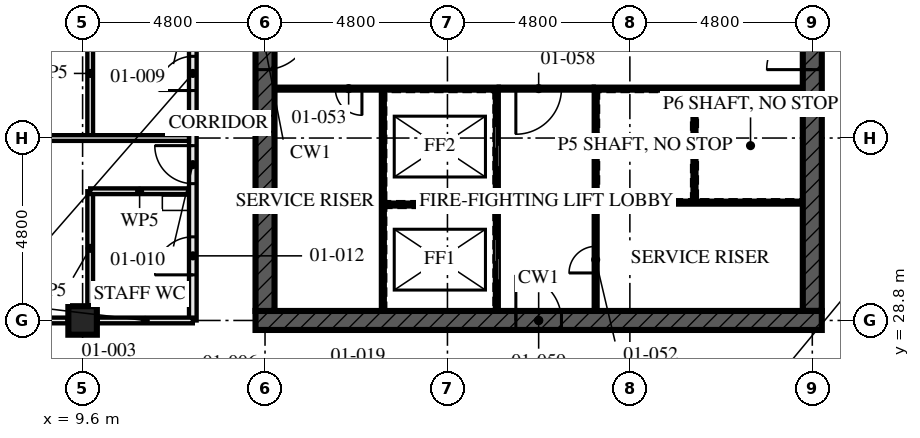
"""IFC4 building model, lengths in metres.
Left out: names, types, materials, properties, quantities, classifications, styles, units other than length and angle.
Written with IfcOpenShell. Run it as: python <this file> out.ifc"""

import sys

from ifc_helpers import new_model, si_unit, direction, frame, frame_2d, origin, origin_2d, place, context, subcontext, project, spatial, rectangle, hollow_rectangle, extrude, element, fill, save


model = new_model("IFC4")
c1 = context("Model", 3, precision=1e-05, world=origin(), true_north=direction((0.0, 1.0)))
c2 = subcontext(c1, "Body", "Model", "MODEL_VIEW")
j1 = project(units=[si_unit("LENGTHUNIT", "METRE"), si_unit("PLANEANGLEUNIT", "RADIAN")], contexts=[c1])
p1 = place(None, origin())
s1 = spatial("IfcSite", under=j1, at=p1, CompositionType="ELEMENT")
p2 = place(p1, origin())
s2 = spatial("IfcBuilding", under=s1, at=p2, CompositionType="ELEMENT")
p3 = place(p2, frame((0.0, 0.0, 4.5)))
s3 = spatial("IfcBuildingStorey", under=s2, at=p3, CompositionType="ELEMENT", Elevation=4.5)
p4 = place(p3, frame((9.6, 28.8, 0.0), z_axis=(0.0, 0.0, 1.0), x_axis=(0.0, 1.0, 0.0)))
e1 = element("IfcColumn", 1, at=p4, inside=s3, PredefinedType="COLUMN", context=c2, shape_type="SweptSolid", body=[
    extrude(hollow_rectangle(XDim=0.75, YDim=0.75, WallThickness=0.08, at=origin_2d()), origin(), (0.0, 0.0, 1.0), 4.5),
])
p5 = place(p3, frame((14.15, 28.8, -0.17), z_axis=(0.0, 0.0, 1.0), x_axis=(1.0, 0.0, 0.0)))
e2 = element("IfcWall", 2, at=p5, inside=s3, PredefinedType="SHEAR", context=c2, shape_type="SweptSolid", body=[
    extrude(rectangle(XDim=14.9, YDim=0.5, at=frame_2d((7.45, 0.0))), origin(), (0.0, 0.0, 1.0), 4.5),
])
p6 = place(p5, frame((6.85, 0.0, 0.17)))
e3 = element("IfcOpeningElement", 3, at=p6, cuts=e2, PredefinedType="OPENING", context=c2, shape_type="SweptSolid", body=[
    extrude(rectangle(XDim=1.2, YDim=2.1, at=frame_2d((0.6, 1.05))), frame((0.0, 0.26, 0.0), z_axis=(0.0, -1.0, 0.0), x_axis=(1.0, 0.0, 0.0)), (0.0, 0.0, 1.0), 0.521),
])
p7 = place(p3, frame((14.4, 42.95, -0.17), z_axis=(0.0, 0.0, 1.0), x_axis=(0.0, -1.0, 0.0)))
e4 = element("IfcWall", 4, at=p7, inside=s3, PredefinedType="SHEAR", context=c2, shape_type="SweptSolid", body=[
    extrude(rectangle(XDim=13.9, YDim=0.5, at=frame_2d((6.95, 0.0))), origin(), (0.0, 0.0, 1.0), 4.5),
])
p8 = place(p7, frame((6.35, 0.0, 0.17)))
e5 = element("IfcOpeningElement", 5, at=p8, cuts=e4, PredefinedType="OPENING", context=c2, shape_type="SweptSolid", body=[
    extrude(rectangle(XDim=1.2, YDim=2.1, at=frame_2d((0.6, 1.05))), frame((0.0, 0.26, 0.0), z_axis=(0.0, -1.0, 0.0), x_axis=(1.0, 0.0, 0.0)), (0.0, 0.0, 1.0), 0.521),
])
p9 = place(p3, frame((28.8, 29.05, -0.17), z_axis=(0.0, 0.0, 1.0), x_axis=(0.0, 1.0, 0.0)))
e6 = element("IfcWall", 6, at=p9, inside=s3, PredefinedType="SHEAR", context=c2, shape_type="SweptSolid", body=[
    extrude(rectangle(XDim=13.9, YDim=0.5, at=frame_2d((6.95, 0.0))), origin(), (0.0, 0.0, 1.0), 4.5),
])
p10 = place(p9, frame((6.35, 0.0, 0.17)))
e7 = element("IfcOpeningElement", 7, at=p10, cuts=e6, PredefinedType="OPENING", context=c2, shape_type="SweptSolid", body=[
    extrude(rectangle(XDim=1.2, YDim=2.1, at=frame_2d((0.6, 1.05))), frame((0.0, 0.26, 0.0), z_axis=(0.0, -1.0, 0.0), x_axis=(1.0, 0.0, 0.0)), (0.0, 0.0, 1.0), 0.521),
])
p11 = place(p3, frame((9.8, 37.0, 0.0), z_axis=(0.0, 0.0, 1.0), x_axis=(0.0, -1.0, 0.0)))
e8 = element("IfcWall", 8, at=p11, inside=s3, PredefinedType="PARTITIONING", context=c2, shape_type="SweptSolid", body=[
    extrude(rectangle(XDim=3.4, YDim=0.15, at=frame_2d((1.7, 0.0))), origin(), (0.0, 0.0, 1.0), 4.33),
])
p12 = place(p3, frame((9.8, 32.2, 0.0), z_axis=(0.0, 0.0, 1.0), x_axis=(1.0, 0.0, 0.0)))
e9 = element("IfcWall", 9, at=p12, inside=s3, PredefinedType="PARTITIONING", context=c2, shape_type="SweptSolid", body=[
    extrude(rectangle(XDim=2.6, YDim=0.15, at=frame_2d((1.3, 0.0))), origin(), (0.0, 0.0, 1.0), 4.33),
])
p13 = place(p3, frame((9.8, 32.2, 0.0), z_axis=(0.0, 0.0, 1.0), x_axis=(0.0, -1.0, 0.0)))
e10 = element("IfcWall", 10, at=p13, inside=s3, PredefinedType="PARTITIONING", context=c2, shape_type="SweptSolid", body=[
    extrude(rectangle(XDim=3.005, YDim=0.15, at=frame_2d((1.502, 0.0))), origin(), (0.0, 0.0, 1.0), 4.33),
])
p14 = place(p3, frame((0.395, 33.6, 0.0), z_axis=(0.0, 0.0, 1.0), x_axis=(1.0, 0.0, 0.0)))
e11 = element("IfcWall", 11, at=p14, inside=s3, PredefinedType="PARTITIONING", context=c2, shape_type="SweptSolid", body=[
    extrude(rectangle(XDim=12.005, YDim=0.15, at=frame_2d((6.002, 0.0))), origin(), (0.0, 0.0, 1.0), 3.55),
])
p15 = place(p3, frame((12.5, 43.2, 0.0), z_axis=(0.0, 0.0, 1.0), x_axis=(0.0, -1.0, 0.0)))
e12 = element("IfcWall", 12, at=p15, inside=s3, PredefinedType="PARTITIONING", context=c2, shape_type="SweptSolid", body=[
    extrude(rectangle(XDim=14.4, YDim=0.2, at=frame_2d((7.2, 0.0))), origin(), (0.0, 0.0, 1.0), 3.55),
])
p16 = place(p15, frame((1.4, 0.0, 0.0)))
e13 = element("IfcOpeningElement", 13, at=p16, cuts=e12, PredefinedType="OPENING", context=c2, shape_type="SweptSolid", body=[
    extrude(rectangle(XDim=1.0, YDim=2.1, at=frame_2d((0.5, 1.05))), frame((0.0, 0.111, 0.0), z_axis=(0.0, -1.0, 0.0), x_axis=(1.0, 0.0, 0.0)), (0.0, 0.0, 1.0), 0.221),
])
p17 = place(p15, frame((3.6, 0.0, 0.0)))
e14 = element("IfcOpeningElement", 14, at=p17, cuts=e12, PredefinedType="OPENING", context=c2, shape_type="SweptSolid", body=[
    extrude(rectangle(XDim=1.0, YDim=2.4, at=frame_2d((0.5, 1.2))), frame((0.0, 0.111, 0.0), z_axis=(0.0, -1.0, 0.0), x_axis=(1.0, 0.0, 0.0)), (0.0, 0.0, 1.0), 0.221),
])
p18 = place(p15, frame((5.0, 0.0, 0.0)))
e15 = element("IfcOpeningElement", 15, at=p18, cuts=e12, PredefinedType="OPENING", context=c2, shape_type="SweptSolid", body=[
    extrude(rectangle(XDim=1.0, YDim=2.4, at=frame_2d((0.5, 1.2))), frame((0.0, 0.111, 0.0), z_axis=(0.0, -1.0, 0.0), x_axis=(1.0, 0.0, 0.0)), (0.0, 0.0, 1.0), 0.221),
])
p19 = place(p15, frame((9.8, 0.0, 0.0)))
e16 = element("IfcOpeningElement", 16, at=p19, cuts=e12, PredefinedType="OPENING", context=c2, shape_type="SweptSolid", body=[
    extrude(rectangle(XDim=1.0, YDim=2.4, at=frame_2d((0.5, 1.2))), frame((0.0, 0.111, 0.0), z_axis=(0.0, -1.0, 0.0), x_axis=(1.0, 0.0, 0.0)), (0.0, 0.0, 1.0), 0.221),
])
p20 = place(p15, frame((7.45, 0.0, 0.0)))
e17 = element("IfcOpeningElement", 17, at=p20, cuts=e12, PredefinedType="OPENING", context=c2, shape_type="SweptSolid", body=[
    extrude(rectangle(XDim=0.9, YDim=2.1, at=frame_2d((0.45, 1.05))), frame((0.0, 0.111, 0.0), z_axis=(0.0, -1.0, 0.0), x_axis=(1.0, 0.0, 0.0)), (0.0, 0.0, 1.0), 0.221),
])
p21 = place(p15, frame((12.2, 0.0, 0.0)))
e18 = element("IfcOpeningElement", 18, at=p21, cuts=e12, PredefinedType="OPENING", context=c2, shape_type="SweptSolid", body=[
    extrude(rectangle(XDim=1.0, YDim=2.1, at=frame_2d((0.5, 1.05))), frame((0.0, 0.111, 0.0), z_axis=(0.0, -1.0, 0.0), x_axis=(1.0, 0.0, 0.0)), (0.0, 0.0, 1.0), 0.221),
])
p22 = place(p3, frame((20.5, 29.05, 0.0), z_axis=(0.0, 0.0, 1.0), x_axis=(0.0, 1.0, 0.0)))
e19 = element("IfcWall", 19, at=p22, inside=s3, PredefinedType="SOLIDWALL", context=c2, shape_type="SweptSolid", body=[
    extrude(rectangle(XDim=5.8, YDim=0.1, at=frame_2d((2.9, 0.0))), origin(), (0.0, 0.0, 1.0), 4.33),
])
p23 = place(p22, frame((0.8, 0.0, 0.0)))
e20 = element("IfcOpeningElement", 20, at=p23, cuts=e19, PredefinedType="OPENING", context=c2, shape_type="SweptSolid", body=[
    extrude(rectangle(XDim=1.1, YDim=2.3, at=frame_2d((0.55, 1.15))), frame((0.0, 0.061, 0.0), z_axis=(0.0, -1.0, 0.0), x_axis=(1.0, 0.0, 0.0)), (0.0, 0.0, 1.0), 0.121),
])
p24 = place(p22, frame((3.775, 0.0, 0.0)))
e21 = element("IfcOpeningElement", 21, at=p24, cuts=e19, PredefinedType="OPENING", context=c2, shape_type="SweptSolid", body=[
    extrude(rectangle(XDim=1.1, YDim=2.3, at=frame_2d((0.55, 1.15))), frame((0.0, 0.061, 0.0), z_axis=(0.0, -1.0, 0.0), x_axis=(1.0, 0.0, 0.0)), (0.0, 0.0, 1.0), 0.121),
])
p25 = place(p3, frame((23.1, 29.05, 0.0), z_axis=(0.0, 0.0, 1.0), x_axis=(0.0, 1.0, 0.0)))
e22 = element("IfcWall", 22, at=p25, inside=s3, PredefinedType="SOLIDWALL", context=c2, shape_type="SweptSolid", body=[
    extrude(rectangle(XDim=5.8, YDim=0.1, at=frame_2d((2.9, 0.0))), origin(), (0.0, 0.0, 1.0), 4.33),
])
p26 = place(p25, frame((1.0, 0.0, 0.0)))
e23 = element("IfcOpeningElement", 23, at=p26, cuts=e22, PredefinedType="OPENING", context=c2, shape_type="SweptSolid", body=[
    extrude(rectangle(XDim=0.7, YDim=2.1, at=frame_2d((0.35, 1.05))), frame((0.0, 0.061, 0.0), z_axis=(0.0, -1.0, 0.0), x_axis=(1.0, 0.0, 0.0)), (0.0, 0.0, 1.0), 0.121),
])
p27 = place(p3, frame((14.65, 34.9, 0.0), z_axis=(0.0, 0.0, 1.0), x_axis=(1.0, 0.0, 0.0)))
e24 = element("IfcWall", 24, at=p27, inside=s3, PredefinedType="SOLIDWALL", context=c2, shape_type="SweptSolid", body=[
    extrude(rectangle(XDim=5.9, YDim=0.1, at=frame_2d((2.95, 0.0))), origin(), (0.0, 0.0, 1.0), 4.33),
])
p28 = place(p27, frame((1.6, 0.0, 0.0)))
e25 = element("IfcOpeningElement", 25, at=p28, cuts=e24, PredefinedType="OPENING", context=c2, shape_type="SweptSolid", body=[
    extrude(rectangle(XDim=0.7, YDim=2.1, at=frame_2d((0.35, 1.05))), frame((0.0, 0.061, 0.0), z_axis=(0.0, -1.0, 0.0), x_axis=(1.0, 0.0, 0.0)), (0.0, 0.0, 1.0), 0.121),
])
p29 = place(p3, frame((23.05, 34.9, 0.0), z_axis=(0.0, 0.0, 1.0), x_axis=(1.0, 0.0, 0.0)))
e26 = element("IfcWall", 26, at=p29, inside=s3, PredefinedType="SOLIDWALL", context=c2, shape_type="SweptSolid", body=[
    extrude(rectangle(XDim=5.5, YDim=0.1, at=frame_2d((2.75, 0.0))), origin(), (0.0, 0.0, 1.0), 4.33),
])
p30 = place(p3, frame((20.55, 34.9, 0.0), z_axis=(0.0, 0.0, 1.0), x_axis=(1.0, 0.0, 0.0)))
e27 = element("IfcWall", 27, at=p30, inside=s3, PredefinedType="SOLIDWALL", context=c2, shape_type="SweptSolid", body=[
    extrude(rectangle(XDim=2.5, YDim=0.1, at=frame_2d((1.25, 0.0))), origin(), (0.0, 0.0, 1.0), 4.33),
])
p31 = place(p30, frame((0.45, 0.0, 0.0)))
e28 = element("IfcOpeningElement", 28, at=p31, cuts=e27, PredefinedType="OPENING", context=c2, shape_type="SweptSolid", body=[
    extrude(rectangle(XDim=1.2, YDim=2.1, at=frame_2d((0.6, 1.05))), frame((0.0, 0.061, 0.0), z_axis=(0.0, -1.0, 0.0), x_axis=(1.0, 0.0, 0.0)), (0.0, 0.0, 1.0), 0.121),
])
p32 = place(p3, frame((17.5, 29.05, 0.0), z_axis=(0.0, 0.0, 1.0), x_axis=(0.0, 1.0, 0.0)))
e29 = element("IfcWall", 29, at=p32, inside=s3, PredefinedType="SOLIDWALL", context=c2, shape_type="SweptSolid", body=[
    extrude(rectangle(XDim=5.8, YDim=0.1, at=frame_2d((2.9, 0.0))), origin(), (0.0, 0.0, 1.0), 4.33),
])
p33 = place(p3, frame((17.55, 31.85, 0.0), z_axis=(0.0, 0.0, 1.0), x_axis=(1.0, 0.0, 0.0)))
e30 = element("IfcWall", 30, at=p33, inside=s3, PredefinedType="SOLIDWALL", context=c2, shape_type="SweptSolid", body=[
    extrude(rectangle(XDim=2.9, YDim=0.1, at=frame_2d((1.45, 0.0))), origin(), (0.0, 0.0, 1.0), 4.33),
])
p34 = place(p3, frame((25.7, 31.95, 0.0), z_axis=(0.0, 0.0, 1.0), x_axis=(0.0, 1.0, 0.0)))
e31 = element("IfcWall", 31, at=p34, inside=s3, PredefinedType="SOLIDWALL", context=c2, shape_type="SweptSolid", body=[
    extrude(rectangle(XDim=2.9, YDim=0.1, at=frame_2d((1.45, 0.0))), origin(), (0.0, 0.0, 1.0), 4.33),
])
p35 = place(p3, frame((23.15, 31.9, 0.0), z_axis=(0.0, 0.0, 1.0), x_axis=(1.0, 0.0, 0.0)))
e32 = element("IfcWall", 32, at=p35, inside=s3, PredefinedType="SOLIDWALL", context=c2, shape_type="SweptSolid", body=[
    extrude(rectangle(XDim=5.4, YDim=0.1, at=frame_2d((2.7, 0.0))), origin(), (0.0, 0.0, 1.0), 4.33),
])
p36 = place(p3, frame((12.5, 28.8, 0.0), z_axis=(0.0, 0.0, 1.0), x_axis=(-1.0, 0.0, 0.0)))
e33 = element("IfcWall", 33, at=p36, inside=s3, PredefinedType="PARTITIONING", context=c2, shape_type="SweptSolid", body=[
    extrude(rectangle(XDim=2.505, YDim=0.15, at=frame_2d((1.252, 0.0))), origin(), (0.0, 0.0, 1.0), 3.32),
])
p37 = place(p3, frame((9.205, 28.8, 0.0), z_axis=(0.0, 0.0, 1.0), x_axis=(-1.0, 0.0, 0.0)))
e34 = element("IfcWall", 34, at=p37, inside=s3, PredefinedType="PARTITIONING", context=c2, shape_type="SweptSolid", body=[
    extrude(rectangle(XDim=4.01, YDim=0.15, at=frame_2d((2.005, 0.0))), origin(), (0.0, 0.0, 1.0), 3.32),
])
p38 = place(p19, frame((1.0, 0.0, 0.0), z_axis=(0.0, 0.0, 1.0), x_axis=(-1.0, 0.0, 0.0)))
e35 = element("IfcDoor", 35, at=p38, inside=s3, OperationType="SINGLE_SWING_LEFT", PredefinedType="DOOR", context=c2, shape_type="SweptSolid", body=[
    extrude(rectangle(XDim=1.0, YDim=2.4, at=frame_2d((0.5, 1.2))), frame((0.0, 0.027, 0.0), z_axis=(0.0, -1.0, 0.0), x_axis=(1.0, 0.0, 0.0)), (0.0, 0.0, 1.0), 0.054),
])
fill(e16, e35)
p39 = place(p20, frame((0.9, 0.0, 0.0), z_axis=(0.0, 0.0, 1.0), x_axis=(-1.0, 0.0, 0.0)))
e36 = element("IfcDoor", 36, at=p39, inside=s3, OperationType="SINGLE_SWING_RIGHT", PredefinedType="DOOR", context=c2, shape_type="SweptSolid", body=[
    extrude(rectangle(XDim=0.9, YDim=2.1, at=frame_2d((0.45, 1.05))), frame((0.0, 0.027, 0.0), z_axis=(0.0, -1.0, 0.0), x_axis=(1.0, 0.0, 0.0)), (0.0, 0.0, 1.0), 0.054),
])
fill(e17, e36)
p40 = place(p21, frame((1.0, 0.0, 0.0), z_axis=(0.0, 0.0, 1.0), x_axis=(-1.0, 0.0, 0.0)))
e37 = element("IfcDoor", 37, at=p40, inside=s3, OperationType="SINGLE_SWING_RIGHT", PredefinedType="DOOR", context=c2, shape_type="SweptSolid", body=[
    extrude(rectangle(XDim=1.0, YDim=2.1, at=frame_2d((0.5, 1.05))), frame((0.0, 0.027, 0.0), z_axis=(0.0, -1.0, 0.0), x_axis=(1.0, 0.0, 0.0)), (0.0, 0.0, 1.0), 0.054),
])
fill(e18, e37)
p41 = place(p23, origin())
e38 = element("IfcDoor", 38, at=p41, inside=s3, OperationType="SLIDING_TO_LEFT", PredefinedType="DOOR", context=c2, shape_type="SweptSolid", body=[
    extrude(rectangle(XDim=1.1, YDim=2.3, at=frame_2d((0.55, 1.15))), frame((0.0, 0.05, 0.0), z_axis=(0.0, -1.0, 0.0), x_axis=(1.0, 0.0, 0.0)), (0.0, 0.0, 1.0), 0.1),
])
fill(e20, e38)
p42 = place(p24, origin())
e39 = element("IfcDoor", 39, at=p42, inside=s3, OperationType="SLIDING_TO_LEFT", PredefinedType="DOOR", context=c2, shape_type="SweptSolid", body=[
    extrude(rectangle(XDim=1.1, YDim=2.3, at=frame_2d((0.55, 1.15))), frame((0.0, 0.05, 0.0), z_axis=(0.0, -1.0, 0.0), x_axis=(1.0, 0.0, 0.0)), (0.0, 0.0, 1.0), 0.1),
])
fill(e21, e39)
p43 = place(p26, origin())
e40 = element("IfcDoor", 40, at=p43, inside=s3, OperationType="SINGLE_SWING_RIGHT", PredefinedType="DOOR", context=c2, shape_type="SweptSolid", body=[
    extrude(rectangle(XDim=0.7, YDim=2.1, at=frame_2d((0.35, 1.05))), frame((0.0, 0.027, 0.0), z_axis=(0.0, -1.0, 0.0), x_axis=(1.0, 0.0, 0.0)), (0.0, 0.0, 1.0), 0.054),
])
fill(e23, e40)
p44 = place(p28, frame((0.7, 0.0, 0.0), z_axis=(0.0, 0.0, 1.0), x_axis=(-1.0, 0.0, 0.0)))
e41 = element("IfcDoor", 41, at=p44, inside=s3, OperationType="SINGLE_SWING_RIGHT", PredefinedType="DOOR", context=c2, shape_type="SweptSolid", body=[
    extrude(rectangle(XDim=0.7, YDim=2.1, at=frame_2d((0.35, 1.05))), frame((0.0, 0.027, 0.0), z_axis=(0.0, -1.0, 0.0), x_axis=(1.0, 0.0, 0.0)), (0.0, 0.0, 1.0), 0.054),
])
fill(e25, e41)
p45 = place(p31, frame((1.2, 0.0, 0.0), z_axis=(0.0, 0.0, 1.0), x_axis=(-1.0, 0.0, 0.0)))
e42 = element("IfcDoor", 42, at=p45, inside=s3, OperationType="SINGLE_SWING_LEFT", PredefinedType="DOOR", context=c2, shape_type="SweptSolid", body=[
    extrude(rectangle(XDim=1.2, YDim=2.1, at=frame_2d((0.6, 1.05))), frame((0.0, 0.027, 0.0), z_axis=(0.0, -1.0, 0.0), x_axis=(1.0, 0.0, 0.0)), (0.0, 0.0, 1.0), 0.054),
])
fill(e28, e42)
p46 = place(p6, origin())
e43 = element("IfcDoor", 43, at=p46, inside=s3, OperationType="SINGLE_SWING_LEFT", PredefinedType="DOOR", context=c2, shape_type="SweptSolid", body=[
    extrude(rectangle(XDim=1.2, YDim=2.1, at=frame_2d((0.6, 1.05))), frame((0.0, 0.027, 0.0), z_axis=(0.0, -1.0, 0.0), x_axis=(1.0, 0.0, 0.0)), (0.0, 0.0, 1.0), 0.054),
])
fill(e3, e43)
p47 = place(p8, origin())
e44 = element("IfcDoor", 44, at=p47, inside=s3, OperationType="SINGLE_SWING_LEFT", PredefinedType="DOOR", context=c2, shape_type="SweptSolid", body=[
    extrude(rectangle(XDim=1.2, YDim=2.1, at=frame_2d((0.6, 1.05))), frame((0.0, 0.027, 0.0), z_axis=(0.0, -1.0, 0.0), x_axis=(1.0, 0.0, 0.0)), (0.0, 0.0, 1.0), 0.054),
])
fill(e5, e44)
p48 = place(p10, origin())
e45 = element("IfcDoor", 45, at=p48, inside=s3, OperationType="SINGLE_SWING_LEFT", PredefinedType="DOOR", context=c2, shape_type="SweptSolid", body=[
    extrude(rectangle(XDim=1.2, YDim=2.1, at=frame_2d((0.6, 1.05))), frame((0.0, 0.027, 0.0), z_axis=(0.0, -1.0, 0.0), x_axis=(1.0, 0.0, 0.0)), (0.0, 0.0, 1.0), 0.054),
])
fill(e7, e45)
save(model, sys.argv[1])
